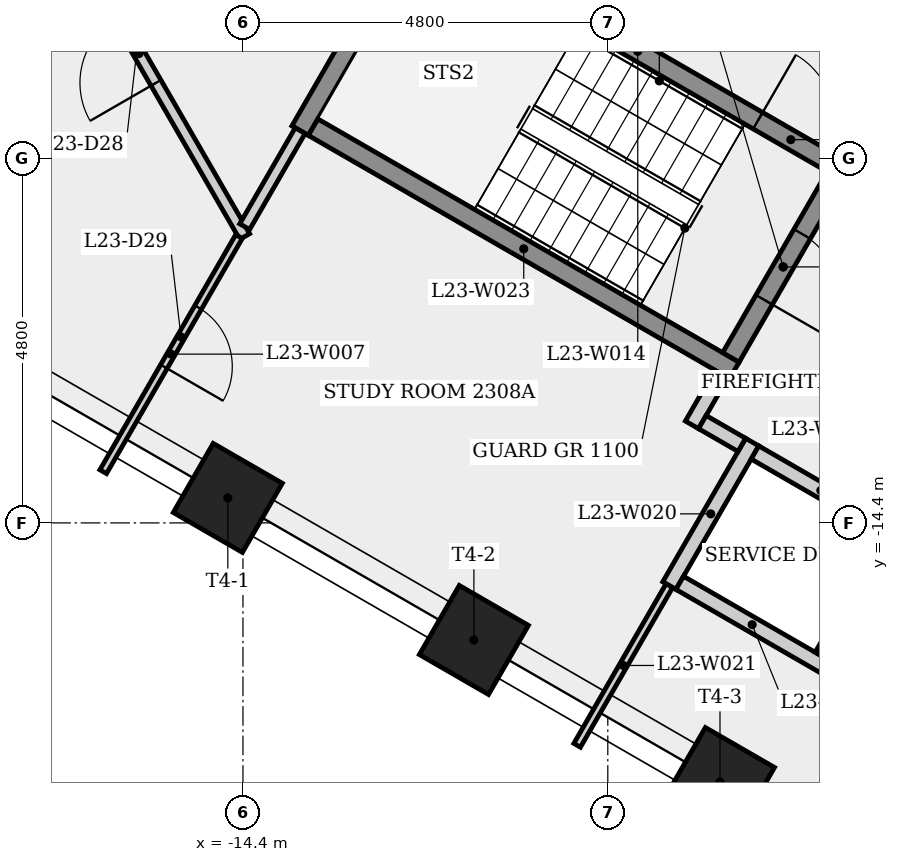
"""IFC4 building model, lengths in metres.
Left out: names, types, materials, properties, quantities, classifications, styles, units other than length and angle.
Written with IfcOpenShell. Run it as: python <this file> out.ifc"""

import sys

from ifc_helpers import new_model, si_unit, direction, frame, frame_2d, origin, origin_2d, place, context, subcontext, project, spatial, rectangle, extrude, element, fill, save


model = new_model("IFC4")
c1 = context("Model", 3, precision=1e-05, world=origin(), true_north=direction((0.0, 1.0)))
c2 = subcontext(c1, "Body", "Model", "MODEL_VIEW")
j1 = project(units=[si_unit("LENGTHUNIT", "METRE"), si_unit("PLANEANGLEUNIT", "RADIAN")], contexts=[c1])
p1 = place(None, origin())
s1 = spatial("IfcSite", under=j1, at=p1, CompositionType="ELEMENT")
p2 = place(p1, origin())
s2 = spatial("IfcBuilding", under=s1, at=p2, CompositionType="ELEMENT")
p3 = place(p2, frame((0.0, 0.0, 89.9)))
s3 = spatial("IfcBuildingStorey", under=s2, at=p3, CompositionType="ELEMENT", Elevation=89.9)
p4 = place(p3, frame((-9.325, -5.182, 0.0), z_axis=(0.0, 0.0, 1.0), x_axis=(0.866023993627, -0.500002442456, 0.0)))
e1 = element("IfcWall", 1, at=p4, inside=s3, PredefinedType="SHEAR", context=c2, shape_type="SweptSolid", body=[
    extrude(rectangle(XDim=10.97, YDim=0.7, at=frame_2d((5.485, 0.0))), origin(), (0.0, 0.0, 1.0), 3.4),
])
p5 = place(p4, frame((2.163, 0.0, 0.0)))
e2 = element("IfcOpeningElement", 2, at=p5, cuts=e1, PredefinedType="OPENING", context=c2, shape_type="SweptSolid", body=[
    extrude(rectangle(XDim=0.9, YDim=2.1, at=frame_2d((0.45, 1.05))), frame((0.0, 0.36, 0.0), z_axis=(0.0, -1.0, 0.0), x_axis=(1.0, 0.0, 0.0)), (0.0, 0.0, 1.0), 0.72),
])
for number, where, z_axis, x_axis in (
    (3, (-14.599, -14.071, 0.0), (0.0, 0.0, 1.0), (-0.5, -0.866, 0.0)),
    (4, (-11.362, -15.94, 0.0), (0.0, 0.0, 1.0), (-0.5, -0.866, 0.0)),
    (5, (-8.124, -17.81, 0.0), (0.0, 0.0, 1.0), (-0.5, -0.866, 0.0)),
):
    element("IfcColumn", number, at=place(p3, frame(where, z_axis=z_axis, x_axis=x_axis)), inside=s3, PredefinedType="COLUMN", context=c2, shape_type="SweptSolid", body=[
        extrude(rectangle(XDim=1.05, YDim=1.05, at=origin_2d()), origin(), (0.0, 0.0, 1.0), 3.4),
    ])
p6 = place(p3, frame((-14.377, -10.632, 0.0), z_axis=(0.0, 0.0, 1.0), x_axis=(-0.500011304563, 0.866018876994, 0.0)))
e6 = element("IfcWall", 6, at=p6, inside=s3, PredefinedType="PARTITIONING", context=c2, shape_type="SweptSolid", body=[
    extrude(rectangle(XDim=5.56, YDim=0.15, at=frame_2d((2.78, 0.0))), origin(), (0.0, 0.0, 1.0), 3.05),
])
p7 = place(p6, frame((2.335, 0.0, 0.0)))
e7 = element("IfcOpeningElement", 7, at=p7, cuts=e6, PredefinedType="OPENING", context=c2, shape_type="SweptSolid", body=[
    extrude(rectangle(XDim=1.0, YDim=2.1, at=frame_2d((0.5, 1.05))), frame((0.0, 0.085, 0.0), z_axis=(0.0, -1.0, 0.0), x_axis=(1.0, 0.0, 0.0)), (0.0, 0.0, 1.0), 0.17),
])
p8 = place(p3, frame((-14.452, -10.632, 0.0), z_axis=(0.0, 0.0, 1.0), x_axis=(-0.500012302351, -0.866018300902, 0.0)))
e8 = element("IfcWall", 8, at=p8, inside=s3, PredefinedType="PARTITIONING", context=c2, shape_type="SweptSolid", body=[
    extrude(rectangle(XDim=3.573, YDim=0.1, at=frame_2d((1.786, 0.0))), origin(), (0.0, 0.0, 1.0), 3.05),
])
p9 = place(p8, frame((1.076, 0.0, 0.0)))
e9 = element("IfcOpeningElement", 9, at=p9, cuts=e8, PredefinedType="OPENING", context=c2, shape_type="SweptSolid", body=[
    extrude(rectangle(XDim=0.9, YDim=2.1, at=frame_2d((0.45, 1.05))), frame((0.0, 0.06, 0.0), z_axis=(0.0, -1.0, 0.0), x_axis=(1.0, 0.0, 0.0)), (0.0, 0.0, 1.0), 0.12),
])
p10 = place(p3, frame((-13.648, -9.239, 0.0), z_axis=(0.0, 0.0, 1.0), x_axis=(0.500017246033, 0.866015446554, 0.0)))
e10 = element("IfcWall", 10, at=p10, inside=s3, PredefinedType="SHEAR", context=c2, shape_type="SweptSolid", body=[
    extrude(rectangle(XDim=3.25, YDim=0.25, at=frame_2d((1.625, 0.0))), origin(), (0.0, 0.0, 1.0), 3.05),
])
p11 = place(p3, frame((-13.648, -9.239, 0.0), z_axis=(0.0, 0.0, 1.0), x_axis=(-0.500079678529, -0.865979396477, 0.0)))
e11 = element("IfcWall", 11, at=p11, inside=s3, PredefinedType="PARTITIONING", context=c2, shape_type="SweptSolid", body=[
    extrude(rectangle(XDim=1.459, YDim=0.15, at=frame_2d((0.729, 0.0))), origin(), (0.0, 0.0, 1.0), 3.05),
])
p12 = place(p3, frame((-11.977, -6.595, 0.0), z_axis=(0.0, 0.0, 1.0), x_axis=(0.866025499775, -0.499999833739, 0.0)))
e12 = element("IfcWall", 12, at=p12, inside=s3, PredefinedType="SHEAR", context=c2, shape_type="SweptSolid", body=[
    extrude(rectangle(XDim=6.4, YDim=0.25, at=frame_2d((3.2, 0.0))), origin(), (0.0, 0.0, 1.0), 3.05),
])
p13 = place(p12, frame((5.025, 0.0, 0.0)))
e13 = element("IfcOpeningElement", 13, at=p13, cuts=e12, PredefinedType="OPENING", context=c2, shape_type="SweptSolid", body=[
    extrude(rectangle(XDim=1.0, YDim=2.1, at=frame_2d((0.5, 1.05))), frame((0.0, 0.135, 0.0), z_axis=(0.0, -1.0, 0.0), x_axis=(1.0, 0.0, 0.0)), (0.0, 0.0, 1.0), 0.27),
])
p14 = place(p3, frame((-8.79, -15.225, 0.0), z_axis=(0.0, 0.0, 1.0), x_axis=(0.500016430238, 0.866015917575, 0.0)))
e14 = element("IfcWall", 14, at=p14, inside=s3, PredefinedType="PLUMBINGWALL", context=c2, shape_type="SweptSolid", body=[
    extrude(rectangle(XDim=2.181, YDim=0.2, at=frame_2d((1.09, 0.0))), origin(), (0.0, 0.0, 1.0), 3.05),
])
p15 = place(p3, frame((-8.79, -15.225, 0.0), z_axis=(0.0, 0.0, 1.0), x_axis=(-0.50002442115, -0.866011303768, 0.0)))
e15 = element("IfcWall", 15, at=p15, inside=s3, PredefinedType="PARTITIONING", context=c2, shape_type="SweptSolid", body=[
    extrude(rectangle(XDim=2.426, YDim=0.1, at=frame_2d((1.213, 0.0))), origin(), (0.0, 0.0, 1.0), 3.05),
])
p16 = place(p3, frame((-8.493, -13.11, 0.0), z_axis=(0.0, 0.0, 1.0), x_axis=(0.500067724834, 0.865986299303, 0.0)))
e16 = element("IfcWall", 16, at=p16, inside=s3, PredefinedType="PARTITIONING", context=c2, shape_type="SweptSolid", body=[
    extrude(rectangle(XDim=0.775, YDim=0.2, at=frame_2d((0.388, 0.0))), origin(), (0.0, 0.0, 1.0), 3.05),
])
p17 = place(p3, frame((-7.935, -12.393, 0.0), z_axis=(0.0, 0.0, 1.0), x_axis=(-0.866025499775, 0.499999833739, 0.0)))
e17 = element("IfcWall", 17, at=p17, inside=s3, PredefinedType="SHEAR", context=c2, shape_type="SweptSolid", body=[
    extrude(rectangle(XDim=6.4, YDim=0.25, at=frame_2d((3.2, 0.0))), origin(), (0.0, 0.0, 1.0), 3.05),
])
p18 = place(p3, frame((-7.836, -13.373, 0.0), z_axis=(0.0, 0.0, 1.0), x_axis=(-0.866232998003, 0.499640263761, 0.0)))
e18 = element("IfcWall", 18, at=p18, inside=s3, PredefinedType="PARTITIONING", context=c2, shape_type="SweptSolid", body=[
    extrude(rectangle(XDim=0.6, YDim=0.2, at=frame_2d((0.3, 0.0))), origin(), (0.0, 0.0, 1.0), 3.05),
])
p19 = place(p3, frame((-6.748, -16.289, 0.0), z_axis=(0.0, 0.0, 1.0), x_axis=(-0.866035918664, 0.499981787252, 0.0)))
e19 = element("IfcWall", 19, at=p19, inside=s3, PredefinedType="PLUMBINGWALL", context=c2, shape_type="SweptSolid", body=[
    extrude(rectangle(XDim=2.2, YDim=0.2, at=frame_2d((1.1, 0.0))), origin(), (0.0, 0.0, 1.0), 3.05),
])
p20 = place(p3, frame((-6.605, -9.841, 0.0), z_axis=(0.0, 0.0, 1.0), x_axis=(-0.499996545922, -0.866027397988, 0.0)))
e20 = element("IfcWall", 20, at=p20, inside=s3, PredefinedType="SHEAR", context=c2, shape_type="SweptSolid", body=[
    extrude(rectangle(XDim=2.75, YDim=0.25, at=frame_2d((1.375, 0.0))), origin(), (0.0, 0.0, 1.0), 3.05),
])
p21 = place(p20, frame((0.875, 0.0, 0.0)))
e21 = element("IfcOpeningElement", 21, at=p21, cuts=e20, PredefinedType="OPENING", context=c2, shape_type="SweptSolid", body=[
    extrude(rectangle(XDim=1.0, YDim=2.1, at=frame_2d((0.5, 1.05))), frame((0.0, 0.135, 0.0), z_axis=(0.0, -1.0, 0.0), x_axis=(1.0, 0.0, 0.0)), (0.0, 0.0, 1.0), 0.27),
])
p22 = place(p3, frame((-5.795, -14.437, 0.0), z_axis=(0.0, 0.0, 1.0), x_axis=(-0.499957196903, -0.866050114754, 0.0)))
e22 = element("IfcWall", 22, at=p22, inside=s3, PredefinedType="PLUMBINGWALL", context=c2, shape_type="SweptSolid", body=[
    extrude(rectangle(XDim=1.981, YDim=0.2, at=frame_2d((0.99, 0.0))), origin(), (0.0, 0.0, 1.0), 3.05),
])
p23 = place(p3, frame((-5.931, -14.473, 0.0), z_axis=(0.0, 0.0, 1.0), x_axis=(-0.866041268327, 0.499972520799, 0.0)))
e23 = element("IfcWall", 23, at=p23, inside=s3, PredefinedType="PLUMBINGWALL", context=c2, shape_type="SweptSolid", body=[
    extrude(rectangle(XDim=2.0, YDim=0.2, at=frame_2d((1.0, 0.0))), origin(), (0.0, 0.0, 1.0), 3.05),
])
p24 = place(p13, origin())
e24 = element("IfcDoor", 24, at=p24, inside=s3, OperationType="SINGLE_SWING_LEFT", PredefinedType="DOOR", context=c2, shape_type="SweptSolid", body=[
    extrude(rectangle(XDim=1.0, YDim=2.1, at=frame_2d((0.5, 1.05))), frame((0.0, 0.025, 0.0), z_axis=(0.0, -1.0, 0.0), x_axis=(1.0, 0.0, 0.0)), (0.0, 0.0, 1.0), 0.05),
])
fill(e13, e24)
p25 = place(p21, origin())
e25 = element("IfcDoor", 25, at=p25, inside=s3, OperationType="SINGLE_SWING_RIGHT", PredefinedType="DOOR", context=c2, shape_type="SweptSolid", body=[
    extrude(rectangle(XDim=1.0, YDim=2.1, at=frame_2d((0.5, 1.05))), frame((0.0, 0.025, 0.0), z_axis=(0.0, -1.0, 0.0), x_axis=(1.0, 0.0, 0.0)), (0.0, 0.0, 1.0), 0.05),
])
fill(e21, e25)
p26 = place(p7, origin())
e26 = element("IfcDoor", 26, at=p26, inside=s3, OperationType="SINGLE_SWING_LEFT", PredefinedType="DOOR", context=c2, shape_type="SweptSolid", body=[
    extrude(rectangle(XDim=1.0, YDim=2.1, at=frame_2d((0.5, 1.05))), frame((0.0, 0.025, 0.0), z_axis=(0.0, -1.0, 0.0), x_axis=(1.0, 0.0, 0.0)), (0.0, 0.0, 1.0), 0.05),
])
fill(e7, e26)
p27 = place(p9, origin())
e27 = element("IfcDoor", 27, at=p27, inside=s3, OperationType="SINGLE_SWING_RIGHT", PredefinedType="DOOR", context=c2, shape_type="SweptSolid", body=[
    extrude(rectangle(XDim=0.9, YDim=2.1, at=frame_2d((0.45, 1.05))), frame((0.0, 0.025, 0.0), z_axis=(0.0, -1.0, 0.0), x_axis=(1.0, 0.0, 0.0)), (0.0, 0.0, 1.0), 0.05),
])
fill(e9, e27)
save(model, sys.argv[1])
